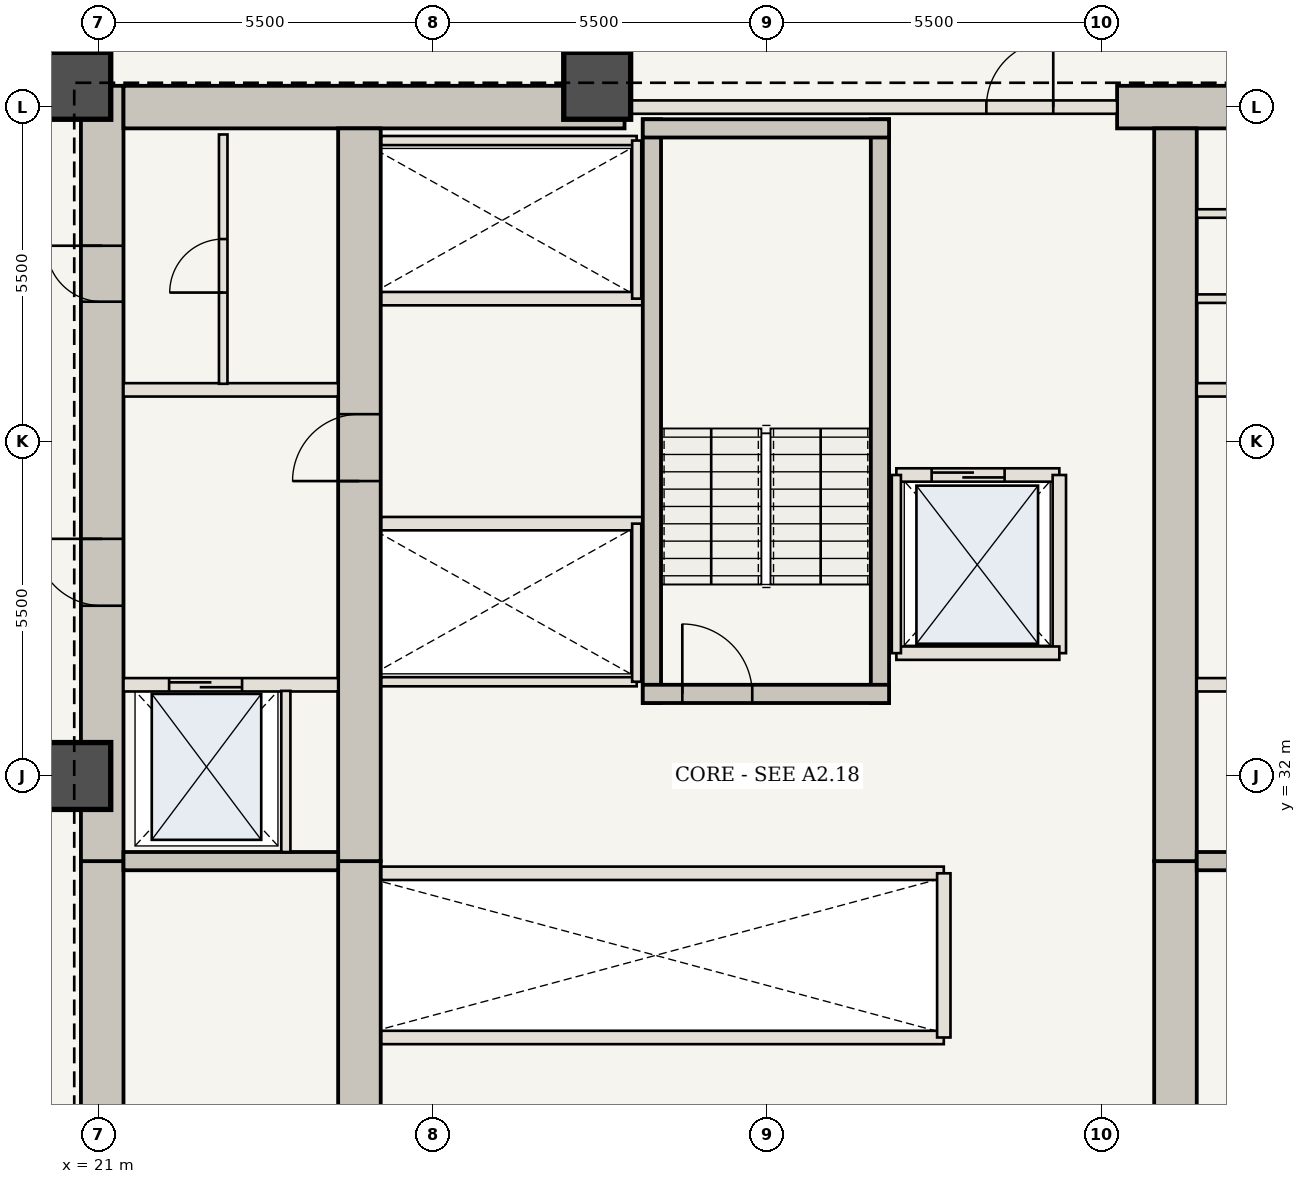
"""IFC4 building model, lengths in metres.
Left out: names, types, materials, properties, quantities, classifications, styles, units other than length and angle.
Written with IfcOpenShell. Run it as: python <this file> out.ifc"""

import sys

from ifc_helpers import new_model, si_unit, direction, frame, frame_2d, origin, origin_2d, place, context, subcontext, project, spatial, rectangle, extrude, element, fill, save


model = new_model("IFC4")
c1 = context("Model", 3, precision=1e-05, world=origin(), true_north=direction((0.0, 1.0)))
c2 = subcontext(c1, "Body", "Model", "MODEL_VIEW")
j1 = project(units=[si_unit("LENGTHUNIT", "METRE"), si_unit("PLANEANGLEUNIT", "RADIAN")], contexts=[c1])
p1 = place(None, origin())
s1 = spatial("IfcSite", under=j1, at=p1, CompositionType="ELEMENT")
p2 = place(p1, origin())
s2 = spatial("IfcBuilding", under=s1, at=p2, CompositionType="ELEMENT")
p3 = place(p2, frame((0.0, 0.0, 70.35)))
s3 = spatial("IfcBuildingStorey", under=s2, at=p3, CompositionType="ELEMENT", Elevation=70.35)
p4 = place(p3, frame((21.06, 20.6, 0.0), z_axis=(0.0, 0.0, 1.0), x_axis=(0.0, 1.0, 0.0)))
e1 = element("IfcWall", 1, at=p4, inside=s3, PredefinedType="SHEAR", context=c2, shape_type="SweptSolid", body=[
    extrude(rectangle(XDim=10.0, YDim=0.7, at=frame_2d((5.0, 0.0))), origin(), (0.0, 0.0, 1.0), 3.5),
])
p5 = place(p4, frame((1.15, 0.0, 0.0)))
e2 = element("IfcOpeningElement", 2, at=p5, cuts=e1, PredefinedType="OPENING", context=c2, shape_type="SweptSolid", body=[
    extrude(rectangle(XDim=1.15, YDim=2.15, at=frame_2d((0.575, 1.075))), frame((0.0, 0.36, 0.0), z_axis=(0.0, -1.0, 0.0), x_axis=(1.0, 0.0, 0.0)), (0.0, 0.0, 1.0), 0.72),
])
p6 = place(p3, frame((21.06, 30.6, 0.0), z_axis=(0.0, 0.0, 1.0), x_axis=(0.0, 1.0, 0.0)))
e3 = element("IfcWall", 3, at=p6, inside=s3, PredefinedType="SHEAR", context=c2, shape_type="SweptSolid", body=[
    extrude(rectangle(XDim=12.75, YDim=0.7, at=frame_2d((6.375, 0.0))), origin(), (0.0, 0.0, 1.0), 3.5),
])
p7 = place(p6, frame((4.2, 0.0, 0.0)))
e4 = element("IfcOpeningElement", 4, at=p7, cuts=e3, PredefinedType="OPENING", context=c2, shape_type="SweptSolid", body=[
    extrude(rectangle(XDim=1.1, YDim=2.15, at=frame_2d((0.55, 1.075))), frame((0.0, 0.36, 0.0), z_axis=(0.0, -1.0, 0.0), x_axis=(1.0, 0.0, 0.0)), (0.0, 0.0, 1.0), 0.72),
])
p8 = place(p6, frame((9.2, 0.0, 0.0)))
e5 = element("IfcOpeningElement", 5, at=p8, cuts=e3, PredefinedType="OPENING", context=c2, shape_type="SweptSolid", body=[
    extrude(rectangle(XDim=0.92, YDim=2.1, at=frame_2d((0.46, 1.05))), frame((0.0, 0.36, 0.0), z_axis=(0.0, -1.0, 0.0), x_axis=(1.0, 0.0, 0.0)), (0.0, 0.0, 1.0), 0.72),
])
p9 = place(p3, frame((21.41, 43.0, 0.0), z_axis=(0.0, 0.0, 1.0), x_axis=(1.0, 0.0, 0.0)))
e6 = element("IfcWall", 6, at=p9, inside=s3, PredefinedType="SHEAR", context=c2, shape_type="SweptSolid", body=[
    extrude(rectangle(XDim=8.24, YDim=0.7, at=frame_2d((4.12, 0.0))), origin(), (0.0, 0.0, 1.0), 3.5),
])
p10 = place(p3, frame((37.75, 43.0, 0.0), z_axis=(0.0, 0.0, 1.0), x_axis=(1.0, 0.0, 0.0)))
e7 = element("IfcWall", 7, at=p10, inside=s3, PredefinedType="SHEAR", context=c2, shape_type="SweptSolid", body=[
    extrude(rectangle(XDim=4.84, YDim=0.7, at=frame_2d((2.42, 0.0))), origin(), (0.0, 0.0, 1.0), 3.5),
])
p11 = place(p3, frame((25.29, 21.3, 0.0), z_axis=(0.0, 0.0, 1.0), x_axis=(0.0, 1.0, 0.0)))
e8 = element("IfcWall", 8, at=p11, inside=s3, PredefinedType="SHEAR", context=c2, shape_type="SweptSolid", body=[
    extrude(rectangle(XDim=9.3, YDim=0.7, at=frame_2d((4.65, 0.0))), origin(), (0.0, 0.0, 1.0), 3.5),
])
p12 = place(p3, frame((25.29, 30.6, 0.0), z_axis=(0.0, 0.0, 1.0), x_axis=(0.0, 1.0, 0.0)))
e9 = element("IfcWall", 9, at=p12, inside=s3, PredefinedType="SHEAR", context=c2, shape_type="SweptSolid", body=[
    extrude(rectangle(XDim=12.05, YDim=0.7, at=frame_2d((6.025, 0.0))), origin(), (0.0, 0.0, 1.0), 3.5),
])
p13 = place(p12, frame((6.25, 0.0, 0.0)))
e10 = element("IfcOpeningElement", 10, at=p13, cuts=e9, PredefinedType="OPENING", context=c2, shape_type="SweptSolid", body=[
    extrude(rectangle(XDim=1.1, YDim=2.15, at=frame_2d((0.55, 1.075))), frame((0.0, 0.36, 0.0), z_axis=(0.0, -1.0, 0.0), x_axis=(1.0, 0.0, 0.0)), (0.0, 0.0, 1.0), 0.72),
])
p14 = place(p3, frame((38.71, 21.3, 0.0), z_axis=(0.0, 0.0, 1.0), x_axis=(0.0, 1.0, 0.0)))
e11 = element("IfcWall", 11, at=p14, inside=s3, PredefinedType="SHEAR", context=c2, shape_type="SweptSolid", body=[
    extrude(rectangle(XDim=9.3, YDim=0.7, at=frame_2d((4.65, 0.0))), origin(), (0.0, 0.0, 1.0), 3.5),
])
p15 = place(p3, frame((38.71, 30.6, 0.0), z_axis=(0.0, 0.0, 1.0), x_axis=(0.0, 1.0, 0.0)))
e12 = element("IfcWall", 12, at=p15, inside=s3, PredefinedType="SHEAR", context=c2, shape_type="SweptSolid", body=[
    extrude(rectangle(XDim=12.05, YDim=0.7, at=frame_2d((6.025, 0.0))), origin(), (0.0, 0.0, 1.0), 3.5),
])
for number, where, z_axis, x_axis in (
    (13, (29.2, 43.35, 0.0), (0.0, 0.0, 1.0), (1.0, 0.0, 0.0)),
    (14, (20.65, 43.35, 0.0), (0.0, 0.0, 1.0), (1.0, 0.0, 0.0)),
    (15, (20.65, 32.0, 0.0), (0.0, 0.0, 1.0), (1.0, 0.0, 0.0)),
):
    element("IfcColumn", number, at=place(p3, frame(where, z_axis=z_axis, x_axis=x_axis)), inside=s3, PredefinedType="COLUMN", context=c2, shape_type="SweptSolid", body=[
        extrude(rectangle(XDim=1.1, YDim=1.1, at=origin_2d()), origin(), (0.0, 0.0, 1.0), 3.5),
    ])
for number, where, z_axis, x_axis in (
    (16, (21.41, 30.6, 0.0), (0.0, 0.0, 1.0), (1.0, 0.0, 0.0)),
    (17, (39.06, 30.6, 0.0), (0.0, 0.0, 1.0), (1.0, 0.0, 0.0)),
):
    element("IfcWall", number, at=place(p3, frame(where, z_axis=z_axis, x_axis=x_axis)), inside=s3, PredefinedType="SHEAR", context=c2, shape_type="SweptSolid", body=[
        extrude(rectangle(XDim=3.53, YDim=0.3, at=frame_2d((1.765, 0.0))), origin(), (0.0, 0.0, 1.0), 3.32),
    ])
p16 = place(p3, frame((21.41, 33.5, 0.0), z_axis=(0.0, 0.0, 1.0), x_axis=(1.0, 0.0, 0.0)))
e18 = element("IfcWall", 18, at=p16, inside=s3, PredefinedType="STANDARD", context=c2, shape_type="SweptSolid", body=[
    extrude(rectangle(XDim=3.53, YDim=0.22, at=frame_2d((1.765, 0.0))), origin(), (0.0, 0.0, 1.0), 3.32),
])
p17 = place(p16, frame((0.75, 0.0, 0.0)))
e19 = element("IfcOpeningElement", 19, at=p17, cuts=e18, PredefinedType="OPENING", context=c2, shape_type="SweptSolid", body=[
    extrude(rectangle(XDim=1.2, YDim=2.2, at=frame_2d((0.6, 1.1))), frame((0.0, 0.12, 0.0), z_axis=(0.0, -1.0, 0.0), x_axis=(1.0, 0.0, 0.0)), (0.0, 0.0, 1.0), 0.24),
])
p18 = place(p3, frame((24.08, 30.75, 0.0), z_axis=(0.0, 0.0, 1.0), x_axis=(0.0, 1.0, 0.0)))
e20 = element("IfcWall", 20, at=p18, inside=s3, PredefinedType="STANDARD", context=c2, shape_type="SweptSolid", body=[
    extrude(rectangle(XDim=2.65, YDim=0.15, at=frame_2d((1.325, 0.0))), origin(), (0.0, 0.0, 1.0), 3.32),
])
p19 = place(p3, frame((39.06, 33.5, 0.0), z_axis=(0.0, 0.0, 1.0), x_axis=(1.0, 0.0, 0.0)))
e21 = element("IfcWall", 21, at=p19, inside=s3, PredefinedType="STANDARD", context=c2, shape_type="SweptSolid", body=[
    extrude(rectangle(XDim=3.53, YDim=0.22, at=frame_2d((1.765, 0.0))), origin(), (0.0, 0.0, 1.0), 3.32),
])
p20 = place(p19, frame((1.55, 0.0, 0.0)))
e22 = element("IfcOpeningElement", 22, at=p20, cuts=e21, PredefinedType="OPENING", context=c2, shape_type="SweptSolid", body=[
    extrude(rectangle(XDim=1.2, YDim=2.2, at=frame_2d((0.6, 1.1))), frame((0.0, 0.12, 0.0), z_axis=(0.0, -1.0, 0.0), x_axis=(1.0, 0.0, 0.0)), (0.0, 0.0, 1.0), 0.24),
])
for number, where, z_axis, x_axis in (
    (23, (21.41, 38.35, 0.0), (0.0, 0.0, 1.0), (1.0, 0.0, 0.0)),
    (24, (39.06, 38.35, 0.0), (0.0, 0.0, 1.0), (1.0, 0.0, 0.0)),
):
    element("IfcWall", number, at=place(p3, frame(where, z_axis=z_axis, x_axis=x_axis)), inside=s3, PredefinedType="STANDARD", context=c2, shape_type="SweptSolid", body=[
        extrude(rectangle(XDim=3.53, YDim=0.22, at=frame_2d((1.765, 0.0))), origin(), (0.0, 0.0, 1.0), 3.32),
    ])
p21 = place(p3, frame((23.05, 38.45, 0.0), z_axis=(0.0, 0.0, 1.0), x_axis=(0.0, 1.0, 0.0)))
e25 = element("IfcWall", 25, at=p21, inside=s3, PredefinedType="STANDARD", context=c2, shape_type="SweptSolid", body=[
    extrude(rectangle(XDim=4.1, YDim=0.14, at=frame_2d((2.05, 0.0))), origin(), (0.0, 0.0, 1.0), 3.32),
])
p22 = place(p21, frame((1.5, 0.0, 0.0)))
e26 = element("IfcOpeningElement", 26, at=p22, cuts=e25, PredefinedType="OPENING", context=c2, shape_type="SweptSolid", body=[
    extrude(rectangle(XDim=0.88, YDim=2.1, at=frame_2d((0.44, 1.05))), frame((0.0, 0.08, 0.0), z_axis=(0.0, -1.0, 0.0), x_axis=(1.0, 0.0, 0.0)), (0.0, 0.0, 1.0), 0.16),
])
for number, where, z_axis, x_axis in (
    (27, (39.06, 39.85, 0.0), (0.0, 0.0, 1.0), (1.0, 0.0, 0.0)),
    (28, (39.06, 41.25, 0.0), (0.0, 0.0, 1.0), (1.0, 0.0, 0.0)),
):
    element("IfcWall", number, at=place(p3, frame(where, z_axis=z_axis, x_axis=x_axis)), inside=s3, PredefinedType="STANDARD", context=c2, shape_type="SweptSolid", body=[
        extrude(rectangle(XDim=3.53, YDim=0.14, at=frame_2d((1.765, 0.0))), origin(), (0.0, 0.0, 1.0), 3.32),
    ])
for number, where, z_axis, x_axis in (
    (29, (25.65, 27.7, 0.0), (0.0, 0.0, 1.0), (1.0, 0.0, 0.0)),
    (30, (25.65, 30.4, 0.0), (0.0, 0.0, 1.0), (1.0, 0.0, 0.0)),
):
    element("IfcWall", number, at=place(p3, frame(where, z_axis=z_axis, x_axis=x_axis)), inside=s3, PredefinedType="STANDARD", context=c2, shape_type="SweptSolid", body=[
        extrude(rectangle(XDim=9.25, YDim=0.22, at=frame_2d((4.625, 0.0))), origin(), (0.0, 0.0, 1.0), 3.32),
    ])
p23 = place(p3, frame((34.9, 27.7, 0.0), z_axis=(0.0, 0.0, 1.0), x_axis=(0.0, 1.0, 0.0)))
e31 = element("IfcWall", 31, at=p23, inside=s3, PredefinedType="STANDARD", context=c2, shape_type="SweptSolid", body=[
    extrude(rectangle(XDim=2.7, YDim=0.22, at=frame_2d((1.35, 0.0))), origin(), (0.0, 0.0, 1.0), 3.32),
])
p24 = place(p3, frame((25.65, 36.15, 0.0), z_axis=(0.0, 0.0, 1.0), x_axis=(1.0, 0.0, 0.0)))
e32 = element("IfcWall", 32, at=p24, inside=s3, PredefinedType="STANDARD", context=c2, shape_type="SweptSolid", body=[
    extrude(rectangle(XDim=4.3, YDim=0.22, at=frame_2d((2.15, 0.0))), origin(), (0.0, 0.0, 1.0), 3.32),
])
p25 = place(p3, frame((25.65, 33.55, 0.0), z_axis=(0.0, 0.0, 1.0), x_axis=(1.0, 0.0, 0.0)))
e33 = element("IfcWall", 33, at=p25, inside=s3, PredefinedType="STANDARD", context=c2, shape_type="SweptSolid", body=[
    extrude(rectangle(XDim=4.2, YDim=0.15, at=frame_2d((2.1, 0.0))), origin(), (0.0, 0.0, 1.0), 3.32),
])
p26 = place(p3, frame((29.85, 33.55, 0.0), z_axis=(0.0, 0.0, 1.0), x_axis=(0.0, 1.0, 0.0)))
e34 = element("IfcWall", 34, at=p26, inside=s3, PredefinedType="STANDARD", context=c2, shape_type="SweptSolid", body=[
    extrude(rectangle(XDim=2.6, YDim=0.15, at=frame_2d((1.3, 0.0))), origin(), (0.0, 0.0, 1.0), 3.32),
])
p27 = place(p3, frame((25.65, 39.85, 0.0), z_axis=(0.0, 0.0, 1.0), x_axis=(1.0, 0.0, 0.0)))
e35 = element("IfcWall", 35, at=p27, inside=s3, PredefinedType="STANDARD", context=c2, shape_type="SweptSolid", body=[
    extrude(rectangle(XDim=4.3, YDim=0.22, at=frame_2d((2.15, 0.0))), origin(), (0.0, 0.0, 1.0), 3.32),
])
p28 = place(p3, frame((25.65, 42.45, 0.0), z_axis=(0.0, 0.0, 1.0), x_axis=(1.0, 0.0, 0.0)))
e36 = element("IfcWall", 36, at=p28, inside=s3, PredefinedType="STANDARD", context=c2, shape_type="SweptSolid", body=[
    extrude(rectangle(XDim=4.2, YDim=0.15, at=frame_2d((2.1, 0.0))), origin(), (0.0, 0.0, 1.0), 3.32),
])
p29 = place(p3, frame((29.85, 39.85, 0.0), z_axis=(0.0, 0.0, 1.0), x_axis=(0.0, 1.0, 0.0)))
e37 = element("IfcWall", 37, at=p29, inside=s3, PredefinedType="STANDARD", context=c2, shape_type="SweptSolid", body=[
    extrude(rectangle(XDim=2.6, YDim=0.15, at=frame_2d((1.3, 0.0))), origin(), (0.0, 0.0, 1.0), 3.32),
])
for number, where, z_axis, x_axis in (
    (38, (30.1, 33.2, 0.0), (0.0, 0.0, 1.0), (0.0, 1.0, 0.0)),
    (39, (33.85, 33.2, 0.0), (0.0, 0.0, 1.0), (0.0, 1.0, 0.0)),
):
    element("IfcWall", number, at=place(p3, frame(where, z_axis=z_axis, x_axis=x_axis)), inside=s3, PredefinedType="SHEAR", context=c2, shape_type="SweptSolid", body=[
        extrude(rectangle(XDim=9.6, YDim=0.3, at=frame_2d((4.8, 0.0))), origin(), (0.0, 0.0, 1.0), 3.32),
    ])
p30 = place(p3, frame((29.95, 33.35, 0.0), z_axis=(0.0, 0.0, 1.0), x_axis=(1.0, 0.0, 0.0)))
e40 = element("IfcWall", 40, at=p30, inside=s3, PredefinedType="SHEAR", context=c2, shape_type="SweptSolid", body=[
    extrude(rectangle(XDim=4.05, YDim=0.3, at=frame_2d((2.025, 0.0))), origin(), (0.0, 0.0, 1.0), 3.32),
])
p31 = place(p30, frame((0.65, 0.0, 0.0)))
e41 = element("IfcOpeningElement", 41, at=p31, cuts=e40, PredefinedType="OPENING", context=c2, shape_type="SweptSolid", body=[
    extrude(rectangle(XDim=1.15, YDim=2.15, at=frame_2d((0.575, 1.075))), frame((0.0, 0.16, 0.0), z_axis=(0.0, -1.0, 0.0), x_axis=(1.0, 0.0, 0.0)), (0.0, 0.0, 1.0), 0.32),
])
p32 = place(p3, frame((29.95, 42.65, 0.0), z_axis=(0.0, 0.0, 1.0), x_axis=(1.0, 0.0, 0.0)))
e42 = element("IfcWall", 42, at=p32, inside=s3, PredefinedType="SHEAR", context=c2, shape_type="SweptSolid", body=[
    extrude(rectangle(XDim=4.05, YDim=0.3, at=frame_2d((2.025, 0.0))), origin(), (0.0, 0.0, 1.0), 3.32),
])
p33 = place(p3, frame((29.65, 43.0, 0.0), z_axis=(0.0, 0.0, 1.0), x_axis=(1.0, 0.0, 0.0)))
e43 = element("IfcWall", 43, at=p33, inside=s3, PredefinedType="STANDARD", context=c2, shape_type="SweptSolid", body=[
    extrude(rectangle(XDim=8.1, YDim=0.22, at=frame_2d((4.05, 0.0))), origin(), (0.0, 0.0, 1.0), 3.32),
])
p34 = place(p33, frame((5.95, 0.0, 0.0)))
e44 = element("IfcOpeningElement", 44, at=p34, cuts=e43, PredefinedType="OPENING", context=c2, shape_type="SweptSolid", body=[
    extrude(rectangle(XDim=1.1, YDim=2.15, at=frame_2d((0.55, 1.075))), frame((0.0, 0.12, 0.0), z_axis=(0.0, -1.0, 0.0), x_axis=(1.0, 0.0, 0.0)), (0.0, 0.0, 1.0), 0.24),
])
p35 = place(p3, frame((34.12, 36.95, 0.0), z_axis=(0.0, 0.0, 1.0), x_axis=(1.0, 0.0, 0.0)))
e45 = element("IfcWall", 45, at=p35, inside=s3, PredefinedType="STANDARD", context=c2, shape_type="SweptSolid", body=[
    extrude(rectangle(XDim=2.68, YDim=0.22, at=frame_2d((1.34, 0.0))), origin(), (0.0, 0.0, 1.0), 3.32),
])
p36 = place(p35, frame((0.58, 0.0, 0.0)))
e46 = element("IfcOpeningElement", 46, at=p36, cuts=e45, PredefinedType="OPENING", context=c2, shape_type="SweptSolid", body=[
    extrude(rectangle(XDim=1.2, YDim=2.2, at=frame_2d((0.6, 1.1))), frame((0.0, 0.12, 0.0), z_axis=(0.0, -1.0, 0.0), x_axis=(1.0, 0.0, 0.0)), (0.0, 0.0, 1.0), 0.24),
])
p37 = place(p3, frame((36.8, 34.02, 0.0), z_axis=(0.0, 0.0, 1.0), x_axis=(0.0, 1.0, 0.0)))
e47 = element("IfcWall", 47, at=p37, inside=s3, PredefinedType="STANDARD", context=c2, shape_type="SweptSolid", body=[
    extrude(rectangle(XDim=2.93, YDim=0.22, at=frame_2d((1.465, 0.0))), origin(), (0.0, 0.0, 1.0), 3.32),
])
p38 = place(p3, frame((34.12, 34.02, 0.0), z_axis=(0.0, 0.0, 1.0), x_axis=(1.0, 0.0, 0.0)))
e48 = element("IfcWall", 48, at=p38, inside=s3, PredefinedType="STANDARD", context=c2, shape_type="SweptSolid", body=[
    extrude(rectangle(XDim=2.68, YDim=0.22, at=frame_2d((1.34, 0.0))), origin(), (0.0, 0.0, 1.0), 3.32),
])
p39 = place(p3, frame((34.12, 34.02, 0.0), z_axis=(0.0, 0.0, 1.0), x_axis=(0.0, 1.0, 0.0)))
e49 = element("IfcWall", 49, at=p39, inside=s3, PredefinedType="STANDARD", context=c2, shape_type="SweptSolid", body=[
    extrude(rectangle(XDim=2.93, YDim=0.15, at=frame_2d((1.465, 0.0))), origin(), (0.0, 0.0, 1.0), 3.32),
])
p40 = place(p7, origin())
e50 = element("IfcDoor", 50, at=p40, inside=s3, OperationType="SINGLE_SWING_RIGHT", PredefinedType="DOOR", context=c2, shape_type="SweptSolid", body=[
    extrude(rectangle(XDim=1.1, YDim=2.15, at=frame_2d((0.55, 1.075))), frame((0.0, 0.025, 0.0), z_axis=(0.0, -1.0, 0.0), x_axis=(1.0, 0.0, 0.0)), (0.0, 0.0, 1.0), 0.05),
])
fill(e4, e50)
p41 = place(p13, origin())
e51 = element("IfcDoor", 51, at=p41, inside=s3, OperationType="SINGLE_SWING_LEFT", PredefinedType="DOOR", context=c2, shape_type="SweptSolid", body=[
    extrude(rectangle(XDim=1.1, YDim=2.15, at=frame_2d((0.55, 1.075))), frame((0.0, 0.025, 0.0), z_axis=(0.0, -1.0, 0.0), x_axis=(1.0, 0.0, 0.0)), (0.0, 0.0, 1.0), 0.05),
])
fill(e10, e51)
p42 = place(p8, origin())
e52 = element("IfcDoor", 52, at=p42, inside=s3, OperationType="SINGLE_SWING_RIGHT", PredefinedType="DOOR", context=c2, shape_type="SweptSolid", body=[
    extrude(rectangle(XDim=0.92, YDim=2.1, at=frame_2d((0.46, 1.05))), frame((0.0, 0.025, 0.0), z_axis=(0.0, -1.0, 0.0), x_axis=(1.0, 0.0, 0.0)), (0.0, 0.0, 1.0), 0.05),
])
fill(e5, e52)
p43 = place(p17, origin())
e53 = element("IfcDoor", 53, at=p43, inside=s3, OperationType="DOUBLE_DOOR_SLIDING", PredefinedType="DOOR", context=c2, shape_type="SweptSolid", body=[
    extrude(rectangle(XDim=1.2, YDim=2.2, at=frame_2d((0.6, 1.1))), frame((0.0, 0.025, 0.0), z_axis=(0.0, -1.0, 0.0), x_axis=(1.0, 0.0, 0.0)), (0.0, 0.0, 1.0), 0.05),
])
fill(e19, e53)
p44 = place(p22, origin())
e54 = element("IfcDoor", 54, at=p44, inside=s3, OperationType="SINGLE_SWING_LEFT", PredefinedType="DOOR", context=c2, shape_type="SweptSolid", body=[
    extrude(rectangle(XDim=0.88, YDim=2.1, at=frame_2d((0.44, 1.05))), frame((0.0, 0.025, 0.0), z_axis=(0.0, -1.0, 0.0), x_axis=(1.0, 0.0, 0.0)), (0.0, 0.0, 1.0), 0.05),
])
fill(e26, e54)
p45 = place(p31, origin())
e55 = element("IfcDoor", 55, at=p45, inside=s3, OperationType="SINGLE_SWING_LEFT", PredefinedType="DOOR", context=c2, shape_type="SweptSolid", body=[
    extrude(rectangle(XDim=1.15, YDim=2.15, at=frame_2d((0.575, 1.075))), frame((0.0, 0.025, 0.0), z_axis=(0.0, -1.0, 0.0), x_axis=(1.0, 0.0, 0.0)), (0.0, 0.0, 1.0), 0.05),
])
fill(e41, e55)
p46 = place(p34, origin())
e56 = element("IfcDoor", 56, at=p46, inside=s3, OperationType="SINGLE_SWING_RIGHT", PredefinedType="DOOR", context=c2, shape_type="SweptSolid", body=[
    extrude(rectangle(XDim=1.1, YDim=2.15, at=frame_2d((0.55, 1.075))), frame((0.0, 0.025, 0.0), z_axis=(0.0, -1.0, 0.0), x_axis=(1.0, 0.0, 0.0)), (0.0, 0.0, 1.0), 0.05),
])
fill(e44, e56)
p47 = place(p36, origin())
e57 = element("IfcDoor", 57, at=p47, inside=s3, OperationType="DOUBLE_DOOR_SLIDING", PredefinedType="DOOR", context=c2, shape_type="SweptSolid", body=[
    extrude(rectangle(XDim=1.2, YDim=2.2, at=frame_2d((0.6, 1.1))), frame((0.0, 0.025, 0.0), z_axis=(0.0, -1.0, 0.0), x_axis=(1.0, 0.0, 0.0)), (0.0, 0.0, 1.0), 0.05),
])
fill(e46, e57)
save(model, sys.argv[1])
